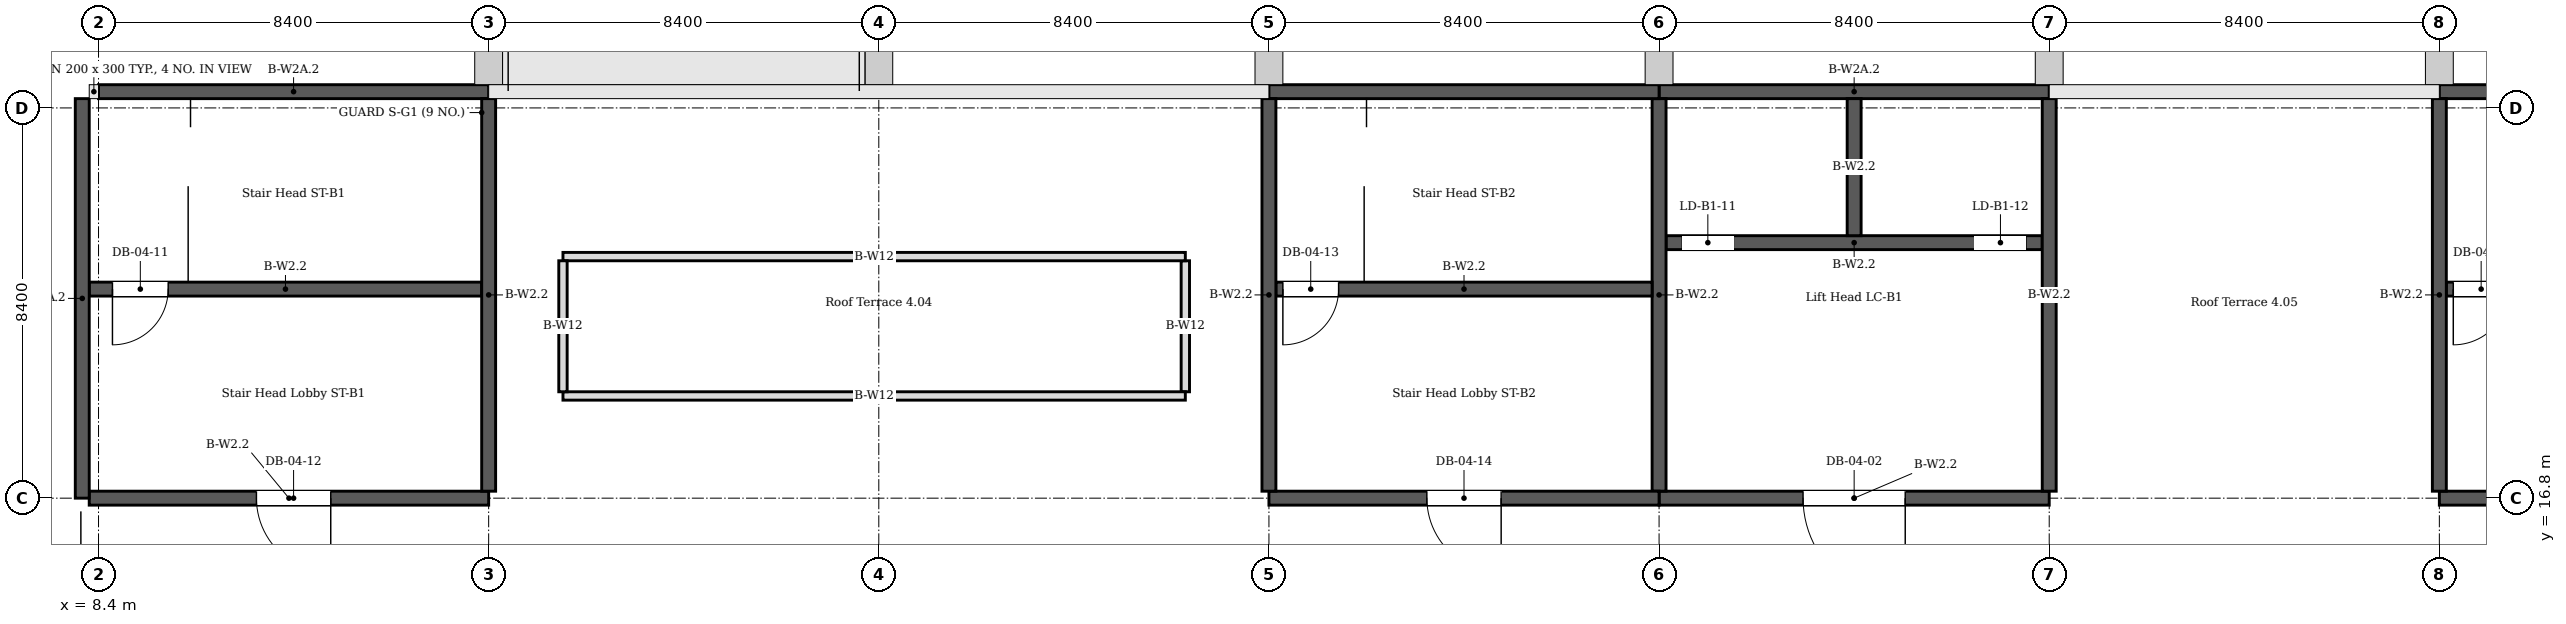
"""IFC4 building model, lengths in metres.
Left out: names, types, materials, properties, quantities, classifications, styles, units other than length and angle.
Written with IfcOpenShell. Run it as: python <this file> out.ifc"""

import sys

from ifc_helpers import new_model, si_unit, direction, frame, frame_2d, origin, place, context, subcontext, project, spatial, rectangle, extrude, element, fill, save


model = new_model("IFC4")
c1 = context("Model", 3, precision=1e-05, world=origin(), true_north=direction((0.0, 1.0)))
c2 = subcontext(c1, "Body", "Model", "MODEL_VIEW")
j1 = project(units=[si_unit("LENGTHUNIT", "METRE"), si_unit("PLANEANGLEUNIT", "RADIAN")], contexts=[c1])
p1 = place(None, origin())
s1 = spatial("IfcSite", under=j1, at=p1, CompositionType="ELEMENT")
p2 = place(p1, origin())
s2 = spatial("IfcBuilding", under=s1, at=p2, CompositionType="ELEMENT")
p3 = place(p2, frame((0.0, 0.0, 18.6)))
s3 = spatial("IfcBuildingStorey", under=s2, at=p3, CompositionType="ELEMENT", Elevation=18.6)
for number, where, z_axis, x_axis in (
    (1, (42.0, 16.95, 0.0), (0.0, 0.0, 1.0), (0.0, 1.0, 0.0)),
    (2, (50.4, 16.95, 0.0), (0.0, 0.0, 1.0), (0.0, 1.0, 0.0)),
):
    element("IfcWall", number, at=place(p3, frame(where, z_axis=z_axis, x_axis=x_axis)), inside=s3, PredefinedType="SHEAR", context=c2, shape_type="SweptSolid", body=[
        extrude(rectangle(XDim=8.45, YDim=0.3, at=frame_2d((4.225, 0.0))), origin(), (0.0, 0.0, 1.0), 3.89),
    ])
p4 = place(p3, frame((42.0, 16.8, 0.0), z_axis=(0.0, 0.0, 1.0), x_axis=(1.0, 0.0, 0.0)))
e3 = element("IfcWall", 3, at=p4, inside=s3, PredefinedType="SHEAR", context=c2, shape_type="SweptSolid", body=[
    extrude(rectangle(XDim=8.4, YDim=0.3, at=frame_2d((4.2, 0.0))), origin(), (0.0, 0.0, 1.0), 3.89),
])
p5 = place(p4, frame((3.1, 0.0, 0.0)))
e4 = element("IfcOpeningElement", 4, at=p5, cuts=e3, PredefinedType="OPENING", context=c2, shape_type="SweptSolid", body=[
    extrude(rectangle(XDim=2.2, YDim=2.6, at=frame_2d((1.1, 1.3))), frame((0.0, 0.16, 0.0), z_axis=(0.0, -1.0, 0.0), x_axis=(1.0, 0.0, 0.0)), (0.0, 0.0, 1.0), 0.32),
])
p6 = place(p3, frame((42.15, 22.3, 0.0), z_axis=(0.0, 0.0, 1.0), x_axis=(1.0, 0.0, 0.0)))
e5 = element("IfcWall", 5, at=p6, inside=s3, PredefinedType="SHEAR", context=c2, shape_type="SweptSolid", body=[
    extrude(rectangle(XDim=8.1, YDim=0.3, at=frame_2d((4.05, 0.0))), origin(), (0.0, 0.0, 1.0), 3.89),
])
p7 = place(p6, frame((0.35, 0.0, 0.0)))
e6 = element("IfcOpeningElement", 6, at=p7, cuts=e5, PredefinedType="OPENING", context=c2, shape_type="SweptSolid", body=[
    extrude(rectangle(XDim=1.1, YDim=2.2, at=frame_2d((0.55, 1.1))), frame((0.0, 0.16, 0.0), z_axis=(0.0, -1.0, 0.0), x_axis=(1.0, 0.0, 0.0)), (0.0, 0.0, 1.0), 0.32),
])
p8 = place(p6, frame((6.65, 0.0, 0.0)))
e7 = element("IfcOpeningElement", 7, at=p8, cuts=e5, PredefinedType="OPENING", context=c2, shape_type="SweptSolid", body=[
    extrude(rectangle(XDim=1.1, YDim=2.2, at=frame_2d((0.55, 1.1))), frame((0.0, 0.16, 0.0), z_axis=(0.0, -1.0, 0.0), x_axis=(1.0, 0.0, 0.0)), (0.0, 0.0, 1.0), 0.32),
])
p9 = place(p3, frame((42.0, 25.55, 0.0), z_axis=(0.0, 0.0, 1.0), x_axis=(1.0, 0.0, 0.0)))
e8 = element("IfcWall", 8, at=p9, inside=s3, PredefinedType="SHEAR", context=c2, shape_type="SweptSolid", body=[
    extrude(rectangle(XDim=8.4, YDim=0.3, at=frame_2d((4.2, 0.0))), origin(), (0.0, 0.0, 1.0), 3.89),
])
p10 = place(p3, frame((46.2, 22.45, 0.0), z_axis=(0.0, 0.0, 1.0), x_axis=(0.0, 1.0, 0.0)))
e9 = element("IfcWall", 9, at=p10, inside=s3, PredefinedType="SHEAR", context=c2, shape_type="SweptSolid", body=[
    extrude(rectangle(XDim=2.95, YDim=0.3, at=frame_2d((1.475, 0.0))), origin(), (0.0, 0.0, 1.0), 3.89),
])
p11 = place(p3, frame((8.05, 16.8, 0.0), z_axis=(0.0, 0.0, 1.0), x_axis=(0.0, 1.0, 0.0)))
e10 = element("IfcWall", 10, at=p11, inside=s3, PredefinedType="SHEAR", context=c2, shape_type="SweptSolid", body=[
    extrude(rectangle(XDim=8.6, YDim=0.3, at=frame_2d((4.3, 0.0))), origin(), (0.0, 0.0, 1.0), 3.89),
])
p12 = place(p3, frame((16.8, 16.95, 0.0), z_axis=(0.0, 0.0, 1.0), x_axis=(0.0, 1.0, 0.0)))
e11 = element("IfcWall", 11, at=p12, inside=s3, PredefinedType="SHEAR", context=c2, shape_type="SweptSolid", body=[
    extrude(rectangle(XDim=8.45, YDim=0.3, at=frame_2d((4.225, 0.0))), origin(), (0.0, 0.0, 1.0), 3.89),
])
p13 = place(p3, frame((8.2, 16.8, 0.0), z_axis=(0.0, 0.0, 1.0), x_axis=(1.0, 0.0, 0.0)))
e12 = element("IfcWall", 12, at=p13, inside=s3, PredefinedType="SHEAR", context=c2, shape_type="SweptSolid", body=[
    extrude(rectangle(XDim=8.6, YDim=0.3, at=frame_2d((4.3, 0.0))), origin(), (0.0, 0.0, 1.0), 3.89),
])
p14 = place(p13, frame((3.6, 0.0, 0.0)))
e13 = element("IfcOpeningElement", 13, at=p14, cuts=e12, PredefinedType="OPENING", context=c2, shape_type="SweptSolid", body=[
    extrude(rectangle(XDim=1.6, YDim=2.4, at=frame_2d((0.8, 1.2))), frame((0.0, 0.16, 0.0), z_axis=(0.0, -1.0, 0.0), x_axis=(1.0, 0.0, 0.0)), (0.0, 0.0, 1.0), 0.32),
])
p15 = place(p3, frame((8.2, 21.3, 0.0), z_axis=(0.0, 0.0, 1.0), x_axis=(1.0, 0.0, 0.0)))
e14 = element("IfcWall", 14, at=p15, inside=s3, PredefinedType="SHEAR", context=c2, shape_type="SweptSolid", body=[
    extrude(rectangle(XDim=8.45, YDim=0.3, at=frame_2d((4.225, 0.0))), origin(), (0.0, 0.0, 1.0), 3.89),
])
p16 = place(p15, frame((0.5, 0.0, 0.0)))
e15 = element("IfcOpeningElement", 15, at=p16, cuts=e14, PredefinedType="OPENING", context=c2, shape_type="SweptSolid", body=[
    extrude(rectangle(XDim=1.2, YDim=2.1, at=frame_2d((0.6, 1.05))), frame((0.0, 0.16, 0.0), z_axis=(0.0, -1.0, 0.0), x_axis=(1.0, 0.0, 0.0)), (0.0, 0.0, 1.0), 0.32),
])
p17 = place(p3, frame((8.4, 25.55, 0.0), z_axis=(0.0, 0.0, 1.0), x_axis=(1.0, 0.0, 0.0)))
e16 = element("IfcWall", 16, at=p17, inside=s3, PredefinedType="SHEAR", context=c2, shape_type="SweptSolid", body=[
    extrude(rectangle(XDim=8.4, YDim=0.3, at=frame_2d((4.2, 0.0))), origin(), (0.0, 0.0, 1.0), 3.89),
])
p18 = place(p3, frame((33.6, 16.95, 0.0), z_axis=(0.0, 0.0, 1.0), x_axis=(0.0, 1.0, 0.0)))
e17 = element("IfcWall", 17, at=p18, inside=s3, PredefinedType="SHEAR", context=c2, shape_type="SweptSolid", body=[
    extrude(rectangle(XDim=8.45, YDim=0.3, at=frame_2d((4.225, 0.0))), origin(), (0.0, 0.0, 1.0), 3.89),
])
p19 = place(p3, frame((33.6, 16.8, 0.0), z_axis=(0.0, 0.0, 1.0), x_axis=(1.0, 0.0, 0.0)))
e18 = element("IfcWall", 18, at=p19, inside=s3, PredefinedType="SHEAR", context=c2, shape_type="SweptSolid", body=[
    extrude(rectangle(XDim=8.4, YDim=0.3, at=frame_2d((4.2, 0.0))), origin(), (0.0, 0.0, 1.0), 3.89),
])
p20 = place(p19, frame((3.4, 0.0, 0.0)))
e19 = element("IfcOpeningElement", 19, at=p20, cuts=e18, PredefinedType="OPENING", context=c2, shape_type="SweptSolid", body=[
    extrude(rectangle(XDim=1.6, YDim=2.4, at=frame_2d((0.8, 1.2))), frame((0.0, 0.16, 0.0), z_axis=(0.0, -1.0, 0.0), x_axis=(1.0, 0.0, 0.0)), (0.0, 0.0, 1.0), 0.32),
])
p21 = place(p3, frame((33.75, 21.3, 0.0), z_axis=(0.0, 0.0, 1.0), x_axis=(1.0, 0.0, 0.0)))
e20 = element("IfcWall", 20, at=p21, inside=s3, PredefinedType="SHEAR", context=c2, shape_type="SweptSolid", body=[
    extrude(rectangle(XDim=8.1, YDim=0.3, at=frame_2d((4.05, 0.0))), origin(), (0.0, 0.0, 1.0), 3.89),
])
p22 = place(p21, frame((0.15, 0.0, 0.0)))
e21 = element("IfcOpeningElement", 21, at=p22, cuts=e20, PredefinedType="OPENING", context=c2, shape_type="SweptSolid", body=[
    extrude(rectangle(XDim=1.2, YDim=2.1, at=frame_2d((0.6, 1.05))), frame((0.0, 0.16, 0.0), z_axis=(0.0, -1.0, 0.0), x_axis=(1.0, 0.0, 0.0)), (0.0, 0.0, 1.0), 0.32),
])
p23 = place(p3, frame((33.6, 25.55, 0.0), z_axis=(0.0, 0.0, 1.0), x_axis=(1.0, 0.0, 0.0)))
e22 = element("IfcWall", 22, at=p23, inside=s3, PredefinedType="SHEAR", context=c2, shape_type="SweptSolid", body=[
    extrude(rectangle(XDim=8.4, YDim=0.3, at=frame_2d((4.2, 0.0))), origin(), (0.0, 0.0, 1.0), 3.89),
])
p24 = place(p3, frame((58.8, 16.95, 0.0), z_axis=(0.0, 0.0, 1.0), x_axis=(0.0, 1.0, 0.0)))
e23 = element("IfcWall", 23, at=p24, inside=s3, PredefinedType="SHEAR", context=c2, shape_type="SweptSolid", body=[
    extrude(rectangle(XDim=8.45, YDim=0.3, at=frame_2d((4.225, 0.0))), origin(), (0.0, 0.0, 1.0), 3.89),
])
p25 = place(p3, frame((58.8, 16.8, 0.0), z_axis=(0.0, 0.0, 1.0), x_axis=(1.0, 0.0, 0.0)))
e24 = element("IfcWall", 24, at=p25, inside=s3, PredefinedType="SHEAR", context=c2, shape_type="SweptSolid", body=[
    extrude(rectangle(XDim=8.4, YDim=0.3, at=frame_2d((4.2, 0.0))), origin(), (0.0, 0.0, 1.0), 3.89),
])
p26 = place(p25, frame((3.4, 0.0, 0.0)))
e25 = element("IfcOpeningElement", 25, at=p26, cuts=e24, PredefinedType="OPENING", context=c2, shape_type="SweptSolid", body=[
    extrude(rectangle(XDim=1.6, YDim=2.4, at=frame_2d((0.8, 1.2))), frame((0.0, 0.16, 0.0), z_axis=(0.0, -1.0, 0.0), x_axis=(1.0, 0.0, 0.0)), (0.0, 0.0, 1.0), 0.32),
])
p27 = place(p3, frame((58.95, 21.3, 0.0), z_axis=(0.0, 0.0, 1.0), x_axis=(1.0, 0.0, 0.0)))
e26 = element("IfcWall", 26, at=p27, inside=s3, PredefinedType="SHEAR", context=c2, shape_type="SweptSolid", body=[
    extrude(rectangle(XDim=8.1, YDim=0.3, at=frame_2d((4.05, 0.0))), origin(), (0.0, 0.0, 1.0), 3.89),
])
p28 = place(p27, frame((0.15, 0.0, 0.0)))
e27 = element("IfcOpeningElement", 27, at=p28, cuts=e26, PredefinedType="OPENING", context=c2, shape_type="SweptSolid", body=[
    extrude(rectangle(XDim=1.2, YDim=2.1, at=frame_2d((0.6, 1.05))), frame((0.0, 0.16, 0.0), z_axis=(0.0, -1.0, 0.0), x_axis=(1.0, 0.0, 0.0)), (0.0, 0.0, 1.0), 0.32),
])
p29 = place(p3, frame((58.8, 25.55, 0.0), z_axis=(0.0, 0.0, 1.0), x_axis=(1.0, 0.0, 0.0)))
e28 = element("IfcWall", 28, at=p29, inside=s3, PredefinedType="SHEAR", context=c2, shape_type="SweptSolid", body=[
    extrude(rectangle(XDim=8.4, YDim=0.3, at=frame_2d((4.2, 0.0))), origin(), (0.0, 0.0, 1.0), 3.89),
])
for number, where, z_axis, x_axis in (
    (29, (18.4, 19.0, 0.0), (0.0, 0.0, 1.0), (1.0, 0.0, 0.0)),
    (30, (18.4, 22.0, 0.0), (0.0, 0.0, 1.0), (1.0, 0.0, 0.0)),
):
    element("IfcWall", number, at=place(p3, frame(where, z_axis=z_axis, x_axis=x_axis)), inside=s3, PredefinedType="SOLIDWALL", context=c2, shape_type="SweptSolid", body=[
        extrude(rectangle(XDim=13.4, YDim=0.18, at=frame_2d((6.7, 0.0))), origin(), (0.0, 0.0, 1.0), 0.7),
    ])
for number, where, z_axis, x_axis in (
    (31, (18.4, 19.09, 0.0), (0.0, 0.0, 1.0), (0.0, 1.0, 0.0)),
    (32, (31.8, 19.09, 0.0), (0.0, 0.0, 1.0), (0.0, 1.0, 0.0)),
):
    element("IfcWall", number, at=place(p3, frame(where, z_axis=z_axis, x_axis=x_axis)), inside=s3, PredefinedType="SOLIDWALL", context=c2, shape_type="SweptSolid", body=[
        extrude(rectangle(XDim=2.82, YDim=0.18, at=frame_2d((1.41, 0.0))), origin(), (0.0, 0.0, 1.0), 0.7),
    ])
p30 = place(p5, origin())
e33 = element("IfcDoor", 33, at=p30, inside=s3, OperationType="DOUBLE_DOOR_SINGLE_SWING", PredefinedType="DOOR", context=c2, shape_type="SweptSolid", body=[
    extrude(rectangle(XDim=2.2, YDim=2.6, at=frame_2d((1.1, 1.3))), frame((0.0, 0.025, 0.0), z_axis=(0.0, -1.0, 0.0), x_axis=(1.0, 0.0, 0.0)), (0.0, 0.0, 1.0), 0.05),
])
fill(e4, e33)
p31 = place(p7, origin())
e34 = element("IfcDoor", 34, at=p31, inside=s3, OperationType="SLIDING_TO_LEFT", PredefinedType="DOOR", context=c2, shape_type="SweptSolid", body=[
    extrude(rectangle(XDim=1.1, YDim=2.2, at=frame_2d((0.55, 1.1))), frame((0.0, 0.025, 0.0), z_axis=(0.0, -1.0, 0.0), x_axis=(1.0, 0.0, 0.0)), (0.0, 0.0, 1.0), 0.05),
])
fill(e6, e34)
p32 = place(p8, origin())
e35 = element("IfcDoor", 35, at=p32, inside=s3, OperationType="SLIDING_TO_LEFT", PredefinedType="DOOR", context=c2, shape_type="SweptSolid", body=[
    extrude(rectangle(XDim=1.1, YDim=2.2, at=frame_2d((0.55, 1.1))), frame((0.0, 0.025, 0.0), z_axis=(0.0, -1.0, 0.0), x_axis=(1.0, 0.0, 0.0)), (0.0, 0.0, 1.0), 0.05),
])
fill(e7, e35)
p33 = place(p16, origin())
e36 = element("IfcDoor", 36, at=p33, inside=s3, OperationType="SINGLE_SWING_LEFT", PredefinedType="DOOR", context=c2, shape_type="SweptSolid", body=[
    extrude(rectangle(XDim=1.2, YDim=2.1, at=frame_2d((0.6, 1.05))), frame((0.0, 0.025, 0.0), z_axis=(0.0, -1.0, 0.0), x_axis=(1.0, 0.0, 0.0)), (0.0, 0.0, 1.0), 0.05),
])
fill(e15, e36)
p34 = place(p14, origin())
e37 = element("IfcDoor", 37, at=p34, inside=s3, OperationType="DOUBLE_DOOR_SINGLE_SWING", PredefinedType="DOOR", context=c2, shape_type="SweptSolid", body=[
    extrude(rectangle(XDim=1.6, YDim=2.4, at=frame_2d((0.8, 1.2))), frame((0.0, 0.025, 0.0), z_axis=(0.0, -1.0, 0.0), x_axis=(1.0, 0.0, 0.0)), (0.0, 0.0, 1.0), 0.05),
])
fill(e13, e37)
p35 = place(p22, origin())
e38 = element("IfcDoor", 38, at=p35, inside=s3, OperationType="SINGLE_SWING_LEFT", PredefinedType="DOOR", context=c2, shape_type="SweptSolid", body=[
    extrude(rectangle(XDim=1.2, YDim=2.1, at=frame_2d((0.6, 1.05))), frame((0.0, 0.025, 0.0), z_axis=(0.0, -1.0, 0.0), x_axis=(1.0, 0.0, 0.0)), (0.0, 0.0, 1.0), 0.05),
])
fill(e21, e38)
p36 = place(p20, origin())
e39 = element("IfcDoor", 39, at=p36, inside=s3, OperationType="DOUBLE_DOOR_SINGLE_SWING", PredefinedType="DOOR", context=c2, shape_type="SweptSolid", body=[
    extrude(rectangle(XDim=1.6, YDim=2.4, at=frame_2d((0.8, 1.2))), frame((0.0, 0.025, 0.0), z_axis=(0.0, -1.0, 0.0), x_axis=(1.0, 0.0, 0.0)), (0.0, 0.0, 1.0), 0.05),
])
fill(e19, e39)
p37 = place(p28, origin())
e40 = element("IfcDoor", 40, at=p37, inside=s3, OperationType="SINGLE_SWING_LEFT", PredefinedType="DOOR", context=c2, shape_type="SweptSolid", body=[
    extrude(rectangle(XDim=1.2, YDim=2.1, at=frame_2d((0.6, 1.05))), frame((0.0, 0.025, 0.0), z_axis=(0.0, -1.0, 0.0), x_axis=(1.0, 0.0, 0.0)), (0.0, 0.0, 1.0), 0.05),
])
fill(e27, e40)
save(model, sys.argv[1])
